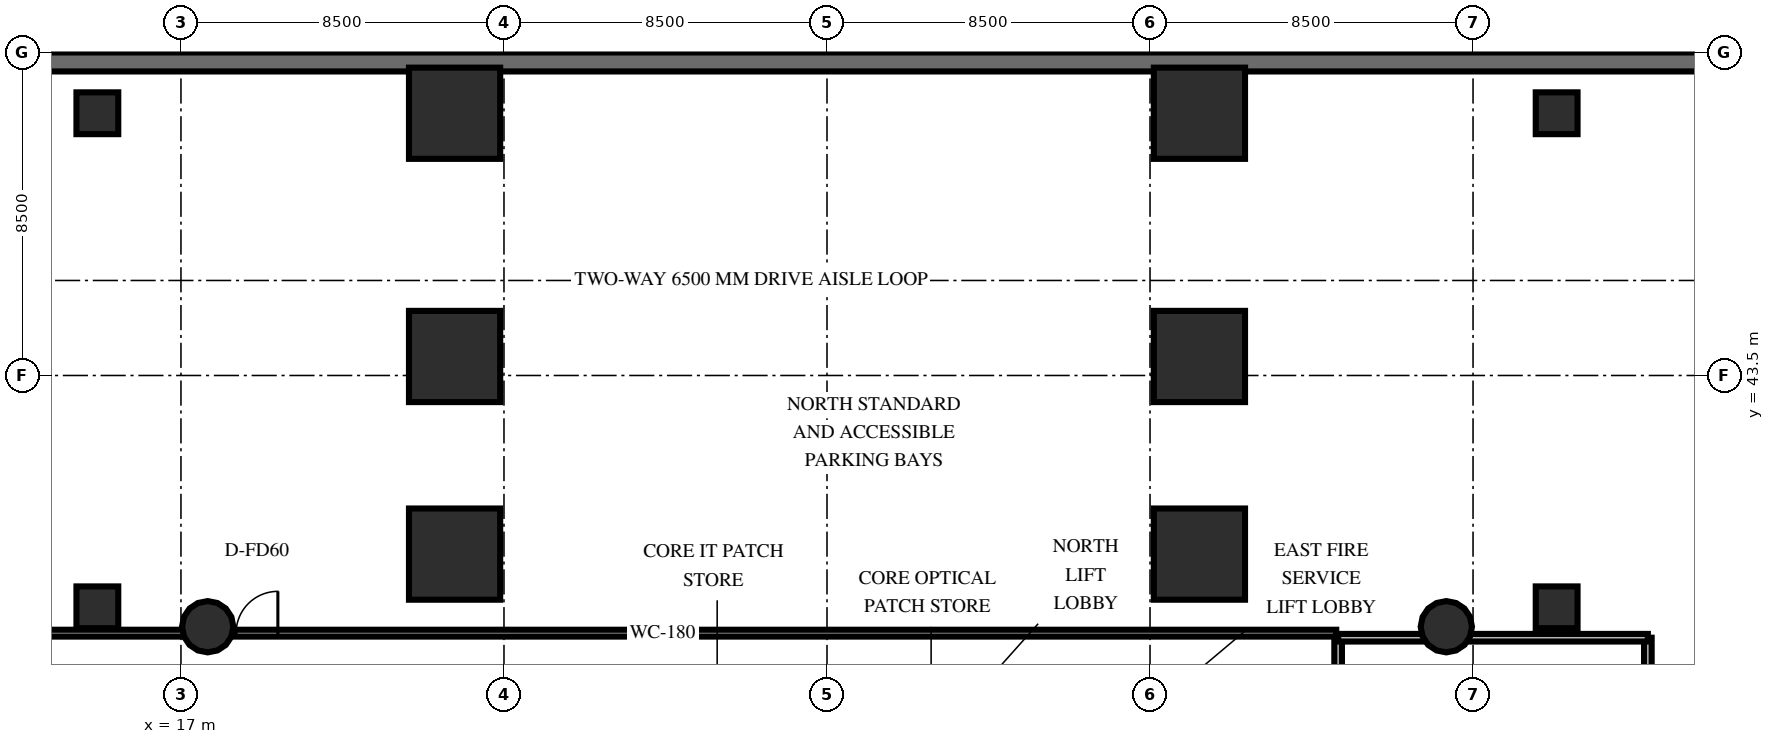
"""IFC4 building model, lengths in metres.
Left out: names, types, materials, properties, quantities, classifications, styles, units other than length and angle.
Written with IfcOpenShell. Run it as: python <this file> out.ifc"""

import sys

from ifc_helpers import new_model, si_unit, direction, frame, frame_2d, origin, origin_2d, place, context, subcontext, project, spatial, rectangle, circle, extrude, element, fill, save


model = new_model("IFC4")
c1 = context("Model", 3, precision=1e-05, world=origin(), true_north=direction((0.0, 1.0)))
c2 = subcontext(c1, "Body", "Model", "MODEL_VIEW")
j1 = project(units=[si_unit("LENGTHUNIT", "METRE"), si_unit("PLANEANGLEUNIT", "RADIAN")], contexts=[c1])
p1 = place(None, origin())
s1 = spatial("IfcSite", under=j1, at=p1, CompositionType="ELEMENT")
p2 = place(p1, origin())
s2 = spatial("IfcBuilding", under=s1, at=p2, CompositionType="ELEMENT")
p3 = place(p2, frame((0.0, 0.0, -4.8)))
s3 = spatial("IfcBuildingStorey", under=s2, at=p3, CompositionType="ELEMENT", Elevation=-4.8)
p4 = place(p3, frame((67.75, 51.75, 0.0), z_axis=(0.0, 0.0, 1.0), x_axis=(-1.0, 0.0, 0.0)))
e1 = element("IfcWall", 1, at=p4, inside=s3, PredefinedType="SOLIDWALL", context=c2, shape_type="SweptSolid", body=[
    extrude(rectangle(XDim=67.5, YDim=0.5, at=frame_2d((33.75, 0.0))), origin(), (0.0, 0.0, 1.0), 4.8),
])
for number, where, z_axis, x_axis in (
    (2, (24.2, 38.8, 0.0), (0.0, 0.0, 1.0), (1.0, 0.0, 0.0)),
    (3, (24.2, 44.0, 0.0), (0.0, 0.0, 1.0), (1.0, 0.0, 0.0)),
    (4, (24.2, 50.4, 0.0), (0.0, 0.0, 1.0), (1.0, 0.0, 0.0)),
    (5, (43.8, 38.8, 0.0), (0.0, 0.0, 1.0), (1.0, 0.0, 0.0)),
    (6, (43.8, 44.0, 0.0), (0.0, 0.0, 1.0), (1.0, 0.0, 0.0)),
    (7, (43.8, 50.4, 0.0), (0.0, 0.0, 1.0), (1.0, 0.0, 0.0)),
):
    element("IfcColumn", number, at=place(p3, frame(where, z_axis=z_axis, x_axis=x_axis)), inside=s3, PredefinedType="USERDEFINED", context=c2, shape_type="SweptSolid", body=[
        extrude(rectangle(XDim=2.4, YDim=2.4, at=origin_2d()), origin(), (0.0, 0.0, 1.0), 4.8),
    ])
for number, where, z_axis, x_axis in (
    (8, (14.8, 37.4, 0.0), (0.0, 0.0, 1.0), (1.0, 0.0, 0.0)),
    (9, (14.8, 50.4, 0.0), (0.0, 0.0, 1.0), (1.0, 0.0, 0.0)),
    (10, (53.2, 37.4, 0.0), (0.0, 0.0, 1.0), (1.0, 0.0, 0.0)),
    (11, (53.2, 50.4, 0.0), (0.0, 0.0, 1.0), (1.0, 0.0, 0.0)),
):
    element("IfcColumn", number, at=place(p3, frame(where, z_axis=z_axis, x_axis=x_axis)), inside=s3, PredefinedType="COLUMN", context=c2, shape_type="SweptSolid", body=[
        extrude(rectangle(XDim=1.1, YDim=1.1, at=origin_2d()), origin(), (0.0, 0.0, 1.0), 4.8),
    ])
for number, where, z_axis, x_axis in (
    (12, (50.297, 36.889, 0.0), (0.0, 0.0, 1.0), (1.0, 0.0, 0.0)),
    (13, (17.703, 36.889, 0.0), (0.0, 0.0, 1.0), (1.0, 0.0, 0.0)),
):
    element("IfcColumn", number, at=place(p3, frame(where, z_axis=z_axis, x_axis=x_axis)), inside=s3, PredefinedType="COLUMN", context=c2, shape_type="SweptSolid", body=[
        extrude(circle(Radius=0.675, at=origin_2d()), origin(), (0.0, 0.0, 1.0), 4.8),
    ])
p5 = place(p3, frame((11.95, 36.72, 0.0), z_axis=(0.0, 0.0, 1.0), x_axis=(1.0, 0.0, 0.0)))
e14 = element("IfcWall", 14, at=p5, inside=s3, PredefinedType="PARTITIONING", context=c2, shape_type="SweptSolid", body=[
    extrude(rectangle(XDim=35.45, YDim=0.18, at=frame_2d((17.725, 0.0))), origin(), (0.0, 0.0, 1.0), 3.56),
])
p6 = place(p5, frame((6.5, 0.0, 0.0)))
e15 = element("IfcOpeningElement", 15, at=p6, cuts=e14, PredefinedType="OPENING", context=c2, shape_type="SweptSolid", body=[
    extrude(rectangle(XDim=1.1, YDim=2.15, at=frame_2d((0.55, 1.075))), frame((0.0, 0.1, 0.0), z_axis=(0.0, -1.0, 0.0), x_axis=(1.0, 0.0, 0.0)), (0.0, 0.0, 1.0), 0.2),
])
p7 = place(p3, frame((47.45, 36.6, 0.0), z_axis=(0.0, 0.0, 1.0), x_axis=(0.0, -1.0, 0.0)))
e16 = element("IfcWall", 16, at=p7, inside=s3, PredefinedType="SOLIDWALL", context=c2, shape_type="SweptSolid", body=[
    extrude(rectangle(XDim=23.6, YDim=0.2, at=frame_2d((11.8, 0.0))), origin(), (0.0, 0.0, 1.0), 3.56),
])
p8 = place(p7, frame((11.275, 0.0, 0.0)))
e17 = element("IfcOpeningElement", 17, at=p8, cuts=e16, PredefinedType="OPENING", context=c2, shape_type="SweptSolid", body=[
    extrude(rectangle(XDim=1.05, YDim=2.15, at=frame_2d((0.525, 1.075))), frame((0.0, 0.11, 0.0), z_axis=(0.0, -1.0, 0.0), x_axis=(1.0, 0.0, 0.0)), (0.0, 0.0, 1.0), 0.22),
])
p9 = place(p3, frame((55.6, 13.0, 0.0), z_axis=(0.0, 0.0, 1.0), x_axis=(0.0, 1.0, 0.0)))
e18 = element("IfcWall", 18, at=p9, inside=s3, PredefinedType="SOLIDWALL", context=c2, shape_type="SweptSolid", body=[
    extrude(rectangle(XDim=23.6, YDim=0.2, at=frame_2d((11.8, 0.0))), origin(), (0.0, 0.0, 1.0), 3.56),
])
p10 = place(p3, frame((55.6, 36.6, 0.0), z_axis=(0.0, 0.0, 1.0), x_axis=(-1.0, 0.0, 0.0)))
e19 = element("IfcWall", 19, at=p10, inside=s3, PredefinedType="SOLIDWALL", context=c2, shape_type="SweptSolid", body=[
    extrude(rectangle(XDim=8.15, YDim=0.2, at=frame_2d((4.075, 0.0))), origin(), (0.0, 0.0, 1.0), 3.56),
])
p11 = place(p6, origin())
e20 = element("IfcDoor", 20, at=p11, inside=s3, OperationType="SINGLE_SWING_RIGHT", PredefinedType="DOOR", context=c2, shape_type="SweptSolid", body=[
    extrude(rectangle(XDim=1.1, YDim=2.15, at=frame_2d((0.55, 1.075))), frame((0.0, 0.025, 0.0), z_axis=(0.0, -1.0, 0.0), x_axis=(1.0, 0.0, 0.0)), (0.0, 0.0, 1.0), 0.05),
])
fill(e15, e20)
save(model, sys.argv[1])
